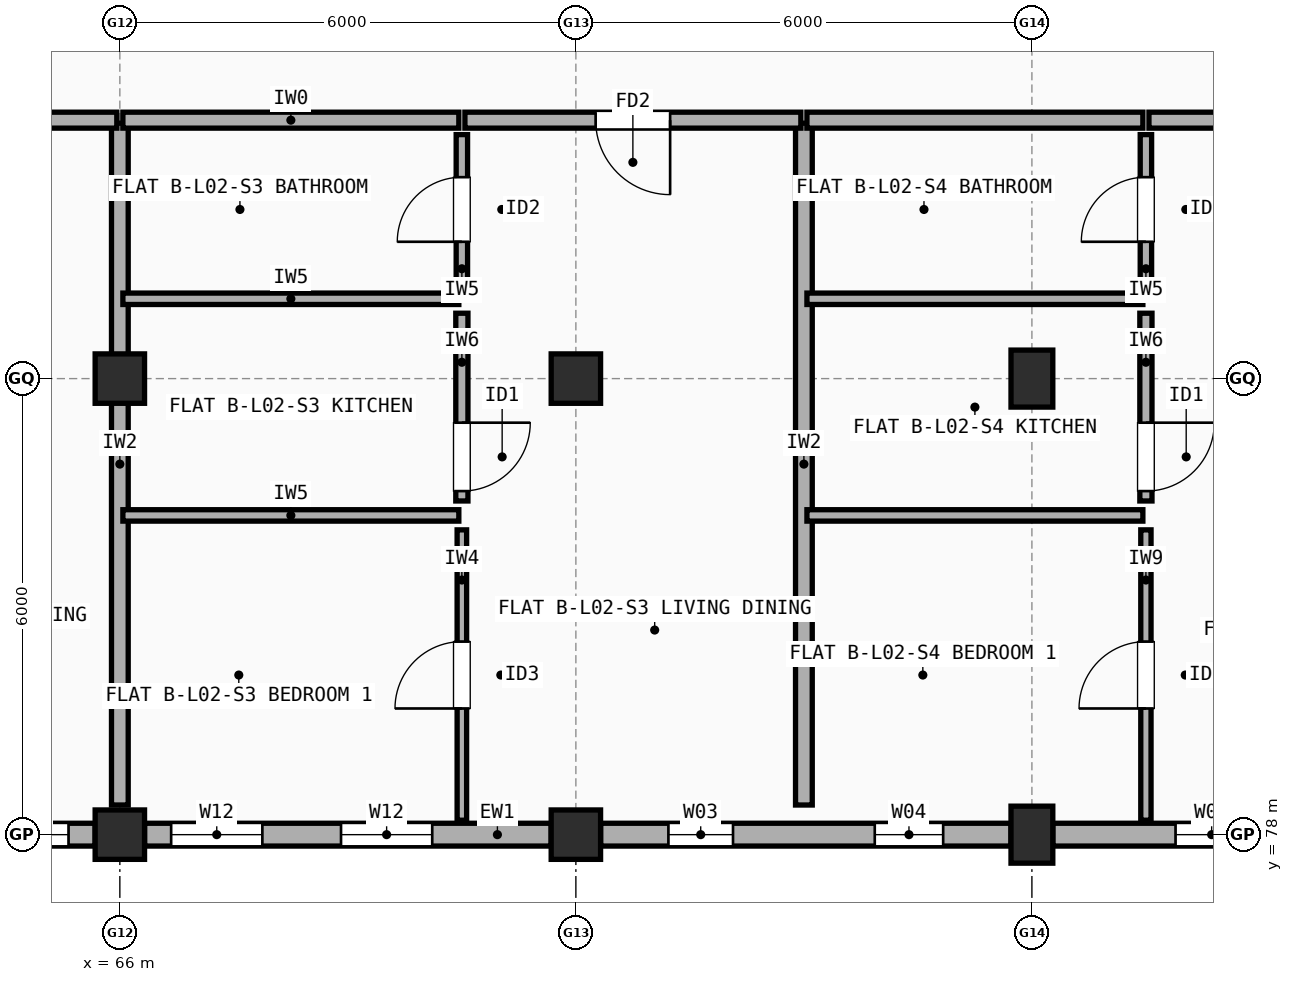
"""IFC4 building model, lengths in metres.
Left out: names, types, materials, properties, quantities, classifications, styles, units other than length and angle.
Written with IfcOpenShell. Run it as: python <this file> out.ifc"""

import sys

from ifc_helpers import new_model, si_unit, direction, frame, frame_2d, origin, origin_2d, place, context, subcontext, project, spatial, rectangle, extrude, element, fill, save


model = new_model("IFC4")
c1 = context("Model", 3, precision=1e-05, world=origin(), true_north=direction((0.0, 1.0)))
c2 = subcontext(c1, "Body", "Model", "MODEL_VIEW")
j1 = project(units=[si_unit("LENGTHUNIT", "METRE"), si_unit("PLANEANGLEUNIT", "RADIAN")], contexts=[c1])
p1 = place(None, origin())
s1 = spatial("IfcSite", under=j1, at=p1, CompositionType="ELEMENT")
p2 = place(p1, origin())
s2 = spatial("IfcBuilding", under=s1, at=p2, CompositionType="ELEMENT")
p3 = place(p2, frame((0.0, 0.0, 7.7)))
s3 = spatial("IfcBuildingStorey", under=s2, at=p3, CompositionType="ELEMENT", Elevation=7.7)
for number, where, z_axis, x_axis in (
    (1, (66.0, 78.0, 0.0), (0.0, 0.0, 1.0), (1.0, 0.0, 0.0)),
    (2, (66.0, 84.0, 0.0), (0.0, 0.0, 1.0), (1.0, 0.0, 0.0)),
    (3, (72.0, 78.0, 0.0), (0.0, 0.0, 1.0), (1.0, 0.0, 0.0)),
    (4, (72.0, 84.0, 0.0), (0.0, 0.0, 1.0), (1.0, 0.0, 0.0)),
):
    element("IfcColumn", number, at=place(p3, frame(where, z_axis=z_axis, x_axis=x_axis)), inside=s3, PredefinedType="COLUMN", context=c2, shape_type="SweptSolid", body=[
        extrude(rectangle(XDim=0.65, YDim=0.65, at=origin_2d()), origin(), (0.0, 0.0, 1.0), 2.955),
    ])
for number, where, z_axis, x_axis in (
    (5, (78.0, 78.0, 0.0), (0.0, 0.0, 1.0), (1.0, 0.0, 0.0)),
    (6, (78.0, 84.0, 0.0), (0.0, 0.0, 1.0), (1.0, 0.0, 0.0)),
):
    element("IfcColumn", number, at=place(p3, frame(where, z_axis=z_axis, x_axis=x_axis)), inside=s3, PredefinedType="COLUMN", context=c2, shape_type="SweptSolid", body=[
        extrude(rectangle(XDim=0.55, YDim=0.75, at=origin_2d()), origin(), (0.0, 0.0, 1.0), 2.955),
    ])
p4 = place(p3, frame((60.325, 78.0, 0.0), z_axis=(0.0, 0.0, 1.0), x_axis=(1.0, 0.0, 0.0)))
e7 = element("IfcWall", 7, at=p4, inside=s3, PredefinedType="STANDARD", context=c2, shape_type="SweptSolid", body=[
    extrude(rectangle(XDim=5.35, YDim=0.3, at=frame_2d((2.675, 0.0))), origin(), (0.0, 0.0, 1.0), 2.437),
])
p5 = place(p4, frame((1.565, 0.0, 0.9)))
e8 = element("IfcOpeningElement", 8, at=p5, cuts=e7, PredefinedType="OPENING", context=c2, shape_type="SweptSolid", body=[
    extrude(rectangle(XDim=0.95, YDim=1.35, at=frame_2d((0.475, 0.675))), frame((0.0, 0.16, 0.0), z_axis=(0.0, -1.0, 0.0), x_axis=(1.0, 0.0, 0.0)), (0.0, 0.0, 1.0), 0.32),
])
p6 = place(p4, frame((4.05, 0.0, 0.9)))
e9 = element("IfcOpeningElement", 9, at=p6, cuts=e7, PredefinedType="OPENING", context=c2, shape_type="SweptSolid", body=[
    extrude(rectangle(XDim=0.95, YDim=1.35, at=frame_2d((0.475, 0.675))), frame((0.0, 0.16, 0.0), z_axis=(0.0, -1.0, 0.0), x_axis=(1.0, 0.0, 0.0)), (0.0, 0.0, 1.0), 0.32),
])
p7 = place(p3, frame((66.325, 78.0, 0.0), z_axis=(0.0, 0.0, 1.0), x_axis=(1.0, 0.0, 0.0)))
e10 = element("IfcWall", 10, at=p7, inside=s3, PredefinedType="STANDARD", context=c2, shape_type="SweptSolid", body=[
    extrude(rectangle(XDim=5.35, YDim=0.3, at=frame_2d((2.675, 0.0))), origin(), (0.0, 0.0, 1.0), 2.437),
])
p8 = place(p7, frame((0.35, 0.0, 0.9)))
e11 = element("IfcOpeningElement", 11, at=p8, cuts=e10, PredefinedType="OPENING", context=c2, shape_type="SweptSolid", body=[
    extrude(rectangle(XDim=1.2, YDim=1.35, at=frame_2d((0.6, 0.675))), frame((0.0, 0.16, 0.0), z_axis=(0.0, -1.0, 0.0), x_axis=(1.0, 0.0, 0.0)), (0.0, 0.0, 1.0), 0.32),
])
p9 = place(p7, frame((2.585, 0.0, 0.9)))
e12 = element("IfcOpeningElement", 12, at=p9, cuts=e10, PredefinedType="OPENING", context=c2, shape_type="SweptSolid", body=[
    extrude(rectangle(XDim=1.2, YDim=1.35, at=frame_2d((0.6, 0.675))), frame((0.0, 0.16, 0.0), z_axis=(0.0, -1.0, 0.0), x_axis=(1.0, 0.0, 0.0)), (0.0, 0.0, 1.0), 0.32),
])
p10 = place(p3, frame((72.325, 78.0, 0.0), z_axis=(0.0, 0.0, 1.0), x_axis=(1.0, 0.0, 0.0)))
e13 = element("IfcWall", 13, at=p10, inside=s3, PredefinedType="STANDARD", context=c2, shape_type="SweptSolid", body=[
    extrude(rectangle(XDim=5.4, YDim=0.3, at=frame_2d((2.7, 0.0))), origin(), (0.0, 0.0, 1.0), 2.437),
])
p11 = place(p10, frame((0.893, 0.0, 0.9)))
e14 = element("IfcOpeningElement", 14, at=p11, cuts=e13, PredefinedType="OPENING", context=c2, shape_type="SweptSolid", body=[
    extrude(rectangle(XDim=0.85, YDim=1.25, at=frame_2d((0.425, 0.625))), frame((0.0, 0.16, 0.0), z_axis=(0.0, -1.0, 0.0), x_axis=(1.0, 0.0, 0.0)), (0.0, 0.0, 1.0), 0.32),
])
p12 = place(p10, frame((3.607, 0.0, 0.9)))
e15 = element("IfcOpeningElement", 15, at=p12, cuts=e13, PredefinedType="OPENING", context=c2, shape_type="SweptSolid", body=[
    extrude(rectangle(XDim=0.9, YDim=1.3, at=frame_2d((0.45, 0.65))), frame((0.0, 0.16, 0.0), z_axis=(0.0, -1.0, 0.0), x_axis=(1.0, 0.0, 0.0)), (0.0, 0.0, 1.0), 0.32),
])
p13 = place(p3, frame((78.275, 78.0, 0.0), z_axis=(0.0, 0.0, 1.0), x_axis=(1.0, 0.0, 0.0)))
e16 = element("IfcWall", 16, at=p13, inside=s3, PredefinedType="STANDARD", context=c2, shape_type="SweptSolid", body=[
    extrude(rectangle(XDim=5.45, YDim=0.3, at=frame_2d((2.725, 0.0))), origin(), (0.0, 0.0, 1.0), 2.437),
])
p14 = place(p13, frame((1.615, 0.0, 0.9)))
e17 = element("IfcOpeningElement", 17, at=p14, cuts=e16, PredefinedType="OPENING", context=c2, shape_type="SweptSolid", body=[
    extrude(rectangle(XDim=0.95, YDim=1.35, at=frame_2d((0.475, 0.675))), frame((0.0, 0.16, 0.0), z_axis=(0.0, -1.0, 0.0), x_axis=(1.0, 0.0, 0.0)), (0.0, 0.0, 1.0), 0.32),
])
p15 = place(p13, frame((4.15, 0.0, 0.9)))
e18 = element("IfcOpeningElement", 18, at=p15, cuts=e16, PredefinedType="OPENING", context=c2, shape_type="SweptSolid", body=[
    extrude(rectangle(XDim=0.95, YDim=1.35, at=frame_2d((0.475, 0.675))), frame((0.0, 0.16, 0.0), z_axis=(0.0, -1.0, 0.0), x_axis=(1.0, 0.0, 0.0)), (0.0, 0.0, 1.0), 0.32),
])
p16 = place(p3, frame((66.0, 78.39, 0.0), z_axis=(0.0, 0.0, 1.0), x_axis=(0.0, 1.0, 0.0)))
e19 = element("IfcWall", 19, at=p16, inside=s3, PredefinedType="SOLIDWALL", context=c2, shape_type="SweptSolid", body=[
    extrude(rectangle(XDim=8.97, YDim=0.22, at=frame_2d((4.485, 0.0))), origin(), (0.0, 0.0, 1.0), 2.337),
])
p17 = place(p3, frame((61.54, 87.4, 0.0), z_axis=(0.0, 0.0, 1.0), x_axis=(1.0, 0.0, 0.0)))
e20 = element("IfcWall", 20, at=p17, inside=s3, PredefinedType="SOLIDWALL", context=c2, shape_type="SweptSolid", body=[
    extrude(rectangle(XDim=4.42, YDim=0.21, at=frame_2d((2.21, 0.0))), origin(), (0.0, 0.0, 1.0), 2.337),
])
p18 = place(p17, frame((1.71, 0.0, 0.0)))
e21 = element("IfcOpeningElement", 21, at=p18, cuts=e20, PredefinedType="OPENING", context=c2, shape_type="SweptSolid", body=[
    extrude(rectangle(XDim=1.0, YDim=2.15, at=frame_2d((0.5, 1.075))), frame((0.0, 0.115, 0.0), z_axis=(0.0, -1.0, 0.0), x_axis=(1.0, 0.0, 0.0)), (0.0, 0.0, 1.0), 0.23),
])
p19 = place(p3, frame((75.0, 78.39, 0.0), z_axis=(0.0, 0.0, 1.0), x_axis=(0.0, 1.0, 0.0)))
e22 = element("IfcWall", 22, at=p19, inside=s3, PredefinedType="SOLIDWALL", context=c2, shape_type="SweptSolid", body=[
    extrude(rectangle(XDim=8.97, YDim=0.22, at=frame_2d((4.485, 0.0))), origin(), (0.0, 0.0, 1.0), 2.437),
])
p20 = place(p3, frame((66.04, 87.4, 0.0), z_axis=(0.0, 0.0, 1.0), x_axis=(1.0, 0.0, 0.0)))
e23 = element("IfcWall", 23, at=p20, inside=s3, PredefinedType="SOLIDWALL", context=c2, shape_type="SweptSolid", body=[
    extrude(rectangle(XDim=4.42, YDim=0.21, at=frame_2d((2.21, 0.0))), origin(), (0.0, 0.0, 1.0), 2.337),
])
p21 = place(p3, frame((70.54, 87.4, 0.0), z_axis=(0.0, 0.0, 1.0), x_axis=(1.0, 0.0, 0.0)))
e24 = element("IfcWall", 24, at=p21, inside=s3, PredefinedType="SOLIDWALL", context=c2, shape_type="SweptSolid", body=[
    extrude(rectangle(XDim=4.42, YDim=0.21, at=frame_2d((2.21, 0.0))), origin(), (0.0, 0.0, 1.0), 2.337),
])
p22 = place(p21, frame((1.72, 0.0, 0.0)))
e25 = element("IfcOpeningElement", 25, at=p22, cuts=e24, PredefinedType="OPENING", context=c2, shape_type="SweptSolid", body=[
    extrude(rectangle(XDim=0.98, YDim=2.15, at=frame_2d((0.49, 1.075))), frame((0.0, 0.115, 0.0), z_axis=(0.0, -1.0, 0.0), x_axis=(1.0, 0.0, 0.0)), (0.0, 0.0, 1.0), 0.23),
])
p23 = place(p3, frame((70.5, 78.19, 0.0), z_axis=(0.0, 0.0, 1.0), x_axis=(0.0, 1.0, 0.0)))
e26 = element("IfcWall", 26, at=p23, inside=s3, PredefinedType="PARTITIONING", context=c2, shape_type="SweptSolid", body=[
    extrude(rectangle(XDim=3.82, YDim=0.125, at=frame_2d((1.91, 0.0))), origin(), (0.0, 0.0, 1.0), 2.955),
])
p24 = place(p23, frame((1.47, 0.0, 0.0)))
e27 = element("IfcOpeningElement", 27, at=p24, cuts=e26, PredefinedType="OPENING", context=c2, shape_type="SweptSolid", body=[
    extrude(rectangle(XDim=0.88, YDim=2.1, at=frame_2d((0.44, 1.05))), frame((0.0, 0.073, 0.0), z_axis=(0.0, -1.0, 0.0), x_axis=(1.0, 0.0, 0.0)), (0.0, 0.0, 1.0), 0.145),
])
p25 = place(p3, frame((70.5, 82.39, 0.0), z_axis=(0.0, 0.0, 1.0), x_axis=(0.0, 1.0, 0.0)))
e28 = element("IfcWall", 28, at=p25, inside=s3, PredefinedType="PLUMBINGWALL", context=c2, shape_type="SweptSolid", body=[
    extrude(rectangle(XDim=2.47, YDim=0.16, at=frame_2d((1.235, 0.0))), origin(), (0.0, 0.0, 1.0), 2.437),
])
p26 = place(p25, frame((0.13, 0.0, 0.0)))
e29 = element("IfcOpeningElement", 29, at=p26, cuts=e28, PredefinedType="OPENING", context=c2, shape_type="SweptSolid", body=[
    extrude(rectangle(XDim=0.9, YDim=2.1, at=frame_2d((0.45, 1.05))), frame((0.0, 0.09, 0.0), z_axis=(0.0, -1.0, 0.0), x_axis=(1.0, 0.0, 0.0)), (0.0, 0.0, 1.0), 0.18),
])
p27 = place(p3, frame((70.5, 85.24, 0.0), z_axis=(0.0, 0.0, 1.0), x_axis=(0.0, 1.0, 0.0)))
e30 = element("IfcWall", 30, at=p27, inside=s3, PredefinedType="PARTITIONING", context=c2, shape_type="SweptSolid", body=[
    extrude(rectangle(XDim=1.97, YDim=0.15, at=frame_2d((0.985, 0.0))), origin(), (0.0, 0.0, 1.0), 2.955),
])
p28 = place(p27, frame((0.56, 0.0, 0.0)))
e31 = element("IfcOpeningElement", 31, at=p28, cuts=e30, PredefinedType="OPENING", context=c2, shape_type="SweptSolid", body=[
    extrude(rectangle(XDim=0.85, YDim=2.1, at=frame_2d((0.425, 1.05))), frame((0.0, 0.085, 0.0), z_axis=(0.0, -1.0, 0.0), x_axis=(1.0, 0.0, 0.0)), (0.0, 0.0, 1.0), 0.17),
])
for number, where, z_axis, x_axis in (
    (32, (66.04, 82.2, 0.0), (0.0, 0.0, 1.0), (1.0, 0.0, 0.0)),
    (33, (66.04, 85.05, 0.0), (0.0, 0.0, 1.0), (1.0, 0.0, 0.0)),
):
    element("IfcWall", number, at=place(p3, frame(where, z_axis=z_axis, x_axis=x_axis)), inside=s3, PredefinedType="PARTITIONING", context=c2, shape_type="SweptSolid", body=[
        extrude(rectangle(XDim=4.42, YDim=0.15, at=frame_2d((2.21, 0.0))), origin(), (0.0, 0.0, 1.0), 2.337),
    ])
p29 = place(p3, frame((75.04, 87.4, 0.0), z_axis=(0.0, 0.0, 1.0), x_axis=(1.0, 0.0, 0.0)))
e34 = element("IfcWall", 34, at=p29, inside=s3, PredefinedType="SOLIDWALL", context=c2, shape_type="SweptSolid", body=[
    extrude(rectangle(XDim=4.42, YDim=0.21, at=frame_2d((2.21, 0.0))), origin(), (0.0, 0.0, 1.0), 2.437),
])
p30 = place(p3, frame((79.54, 87.4, 0.0), z_axis=(0.0, 0.0, 1.0), x_axis=(1.0, 0.0, 0.0)))
e35 = element("IfcWall", 35, at=p30, inside=s3, PredefinedType="SOLIDWALL", context=c2, shape_type="SweptSolid", body=[
    extrude(rectangle(XDim=4.42, YDim=0.21, at=frame_2d((2.21, 0.0))), origin(), (0.0, 0.0, 1.0), 2.437),
])
p31 = place(p30, frame((1.685, 0.0, 0.0)))
e36 = element("IfcOpeningElement", 36, at=p31, cuts=e35, PredefinedType="OPENING", context=c2, shape_type="SweptSolid", body=[
    extrude(rectangle(XDim=1.05, YDim=2.15, at=frame_2d((0.525, 1.075))), frame((0.0, 0.115, 0.0), z_axis=(0.0, -1.0, 0.0), x_axis=(1.0, 0.0, 0.0)), (0.0, 0.0, 1.0), 0.23),
])
p32 = place(p3, frame((79.5, 78.19, 0.0), z_axis=(0.0, 0.0, 1.0), x_axis=(0.0, 1.0, 0.0)))
e37 = element("IfcWall", 37, at=p32, inside=s3, PredefinedType="PARTITIONING", context=c2, shape_type="SweptSolid", body=[
    extrude(rectangle(XDim=3.82, YDim=0.135, at=frame_2d((1.91, 0.0))), origin(), (0.0, 0.0, 1.0), 2.955),
])
p33 = place(p32, frame((1.47, 0.0, 0.0)))
e38 = element("IfcOpeningElement", 38, at=p33, cuts=e37, PredefinedType="OPENING", context=c2, shape_type="SweptSolid", body=[
    extrude(rectangle(XDim=0.88, YDim=2.1, at=frame_2d((0.44, 1.05))), frame((0.0, 0.077, 0.0), z_axis=(0.0, -1.0, 0.0), x_axis=(1.0, 0.0, 0.0)), (0.0, 0.0, 1.0), 0.155),
])
p34 = place(p3, frame((79.5, 82.39, 0.0), z_axis=(0.0, 0.0, 1.0), x_axis=(0.0, 1.0, 0.0)))
e39 = element("IfcWall", 39, at=p34, inside=s3, PredefinedType="PLUMBINGWALL", context=c2, shape_type="SweptSolid", body=[
    extrude(rectangle(XDim=2.47, YDim=0.16, at=frame_2d((1.235, 0.0))), origin(), (0.0, 0.0, 1.0), 2.437),
])
p35 = place(p34, frame((0.13, 0.0, 0.0)))
e40 = element("IfcOpeningElement", 40, at=p35, cuts=e39, PredefinedType="OPENING", context=c2, shape_type="SweptSolid", body=[
    extrude(rectangle(XDim=0.9, YDim=2.1, at=frame_2d((0.45, 1.05))), frame((0.0, 0.09, 0.0), z_axis=(0.0, -1.0, 0.0), x_axis=(1.0, 0.0, 0.0)), (0.0, 0.0, 1.0), 0.18),
])
p36 = place(p3, frame((79.5, 85.24, 0.0), z_axis=(0.0, 0.0, 1.0), x_axis=(0.0, 1.0, 0.0)))
e41 = element("IfcWall", 41, at=p36, inside=s3, PredefinedType="PARTITIONING", context=c2, shape_type="SweptSolid", body=[
    extrude(rectangle(XDim=1.97, YDim=0.15, at=frame_2d((0.985, 0.0))), origin(), (0.0, 0.0, 1.0), 2.955),
])
p37 = place(p36, frame((0.56, 0.0, 0.0)))
e42 = element("IfcOpeningElement", 42, at=p37, cuts=e41, PredefinedType="OPENING", context=c2, shape_type="SweptSolid", body=[
    extrude(rectangle(XDim=0.85, YDim=2.1, at=frame_2d((0.425, 1.05))), frame((0.0, 0.085, 0.0), z_axis=(0.0, -1.0, 0.0), x_axis=(1.0, 0.0, 0.0)), (0.0, 0.0, 1.0), 0.17),
])
for number, where, z_axis, x_axis in (
    (43, (75.04, 82.2, 0.0), (0.0, 0.0, 1.0), (1.0, 0.0, 0.0)),
    (44, (75.04, 85.05, 0.0), (0.0, 0.0, 1.0), (1.0, 0.0, 0.0)),
):
    element("IfcWall", number, at=place(p3, frame(where, z_axis=z_axis, x_axis=x_axis)), inside=s3, PredefinedType="PARTITIONING", context=c2, shape_type="SweptSolid", body=[
        extrude(rectangle(XDim=4.42, YDim=0.15, at=frame_2d((2.21, 0.0))), origin(), (0.0, 0.0, 1.0), 2.437),
    ])
p38 = place(p6, origin())
e45 = element("IfcWindow", 45, at=p38, inside=s3, PartitioningType="SINGLE_PANEL", PredefinedType="WINDOW", context=c2, shape_type="SweptSolid", body=[
    extrude(rectangle(XDim=0.95, YDim=1.35, at=frame_2d((0.475, 0.675))), frame((0.0, 0.03, 0.0), z_axis=(0.0, -1.0, 0.0), x_axis=(1.0, 0.0, 0.0)), (0.0, 0.0, 1.0), 0.06),
])
fill(e9, e45)
p39 = place(p8, origin())
e46 = element("IfcWindow", 46, at=p39, inside=s3, PartitioningType="SINGLE_PANEL", PredefinedType="WINDOW", context=c2, shape_type="SweptSolid", body=[
    extrude(rectangle(XDim=1.2, YDim=1.35, at=frame_2d((0.6, 0.675))), frame((0.0, 0.03, 0.0), z_axis=(0.0, -1.0, 0.0), x_axis=(1.0, 0.0, 0.0)), (0.0, 0.0, 1.0), 0.06),
])
fill(e11, e46)
p40 = place(p9, origin())
e47 = element("IfcWindow", 47, at=p40, inside=s3, PartitioningType="SINGLE_PANEL", PredefinedType="WINDOW", context=c2, shape_type="SweptSolid", body=[
    extrude(rectangle(XDim=1.2, YDim=1.35, at=frame_2d((0.6, 0.675))), frame((0.0, 0.03, 0.0), z_axis=(0.0, -1.0, 0.0), x_axis=(1.0, 0.0, 0.0)), (0.0, 0.0, 1.0), 0.06),
])
fill(e12, e47)
p41 = place(p11, origin())
e48 = element("IfcWindow", 48, at=p41, inside=s3, PartitioningType="SINGLE_PANEL", PredefinedType="WINDOW", context=c2, shape_type="SweptSolid", body=[
    extrude(rectangle(XDim=0.85, YDim=1.25, at=frame_2d((0.425, 0.625))), frame((0.0, 0.03, 0.0), z_axis=(0.0, -1.0, 0.0), x_axis=(1.0, 0.0, 0.0)), (0.0, 0.0, 1.0), 0.06),
])
fill(e14, e48)
p42 = place(p12, origin())
e49 = element("IfcWindow", 49, at=p42, inside=s3, PartitioningType="SINGLE_PANEL", PredefinedType="WINDOW", context=c2, shape_type="SweptSolid", body=[
    extrude(rectangle(XDim=0.9, YDim=1.3, at=frame_2d((0.45, 0.65))), frame((0.0, 0.03, 0.0), z_axis=(0.0, -1.0, 0.0), x_axis=(1.0, 0.0, 0.0)), (0.0, 0.0, 1.0), 0.06),
])
fill(e15, e49)
p43 = place(p14, origin())
e50 = element("IfcWindow", 50, at=p43, inside=s3, PartitioningType="SINGLE_PANEL", PredefinedType="WINDOW", context=c2, shape_type="SweptSolid", body=[
    extrude(rectangle(XDim=0.95, YDim=1.35, at=frame_2d((0.475, 0.675))), frame((0.0, 0.03, 0.0), z_axis=(0.0, -1.0, 0.0), x_axis=(1.0, 0.0, 0.0)), (0.0, 0.0, 1.0), 0.06),
])
fill(e17, e50)
p44 = place(p22, origin())
e51 = element("IfcDoor", 51, at=p44, inside=s3, OperationType="SINGLE_SWING_RIGHT", PredefinedType="DOOR", context=c2, shape_type="SweptSolid", body=[
    extrude(rectangle(XDim=0.98, YDim=2.15, at=frame_2d((0.49, 1.075))), frame((0.0, 0.025, 0.0), z_axis=(0.0, -1.0, 0.0), x_axis=(1.0, 0.0, 0.0)), (0.0, 0.0, 1.0), 0.05),
])
fill(e25, e51)
p45 = place(p24, origin())
e52 = element("IfcDoor", 52, at=p45, inside=s3, OperationType="SINGLE_SWING_LEFT", PredefinedType="DOOR", context=c2, shape_type="SweptSolid", body=[
    extrude(rectangle(XDim=0.88, YDim=2.1, at=frame_2d((0.44, 1.05))), frame((0.0, 0.025, 0.0), z_axis=(0.0, -1.0, 0.0), x_axis=(1.0, 0.0, 0.0)), (0.0, 0.0, 1.0), 0.05),
])
fill(e27, e52)
p46 = place(p26, origin())
e53 = element("IfcDoor", 53, at=p46, inside=s3, OperationType="SINGLE_SWING_RIGHT", PredefinedType="DOOR", context=c2, shape_type="SweptSolid", body=[
    extrude(rectangle(XDim=0.9, YDim=2.1, at=frame_2d((0.45, 1.05))), frame((0.0, 0.025, 0.0), z_axis=(0.0, -1.0, 0.0), x_axis=(1.0, 0.0, 0.0)), (0.0, 0.0, 1.0), 0.05),
])
fill(e29, e53)
p47 = place(p28, origin())
e54 = element("IfcDoor", 54, at=p47, inside=s3, OperationType="SINGLE_SWING_LEFT", PredefinedType="DOOR", context=c2, shape_type="SweptSolid", body=[
    extrude(rectangle(XDim=0.85, YDim=2.1, at=frame_2d((0.425, 1.05))), frame((0.0, 0.025, 0.0), z_axis=(0.0, -1.0, 0.0), x_axis=(1.0, 0.0, 0.0)), (0.0, 0.0, 1.0), 0.05),
])
fill(e31, e54)
p48 = place(p33, origin())
e55 = element("IfcDoor", 55, at=p48, inside=s3, OperationType="SINGLE_SWING_LEFT", PredefinedType="DOOR", context=c2, shape_type="SweptSolid", body=[
    extrude(rectangle(XDim=0.88, YDim=2.1, at=frame_2d((0.44, 1.05))), frame((0.0, 0.025, 0.0), z_axis=(0.0, -1.0, 0.0), x_axis=(1.0, 0.0, 0.0)), (0.0, 0.0, 1.0), 0.05),
])
fill(e38, e55)
p49 = place(p35, origin())
e56 = element("IfcDoor", 56, at=p49, inside=s3, OperationType="SINGLE_SWING_RIGHT", PredefinedType="DOOR", context=c2, shape_type="SweptSolid", body=[
    extrude(rectangle(XDim=0.9, YDim=2.1, at=frame_2d((0.45, 1.05))), frame((0.0, 0.025, 0.0), z_axis=(0.0, -1.0, 0.0), x_axis=(1.0, 0.0, 0.0)), (0.0, 0.0, 1.0), 0.05),
])
fill(e40, e56)
p50 = place(p37, origin())
e57 = element("IfcDoor", 57, at=p50, inside=s3, OperationType="SINGLE_SWING_LEFT", PredefinedType="DOOR", context=c2, shape_type="SweptSolid", body=[
    extrude(rectangle(XDim=0.85, YDim=2.1, at=frame_2d((0.425, 1.05))), frame((0.0, 0.025, 0.0), z_axis=(0.0, -1.0, 0.0), x_axis=(1.0, 0.0, 0.0)), (0.0, 0.0, 1.0), 0.05),
])
fill(e42, e57)
save(model, sys.argv[1])
